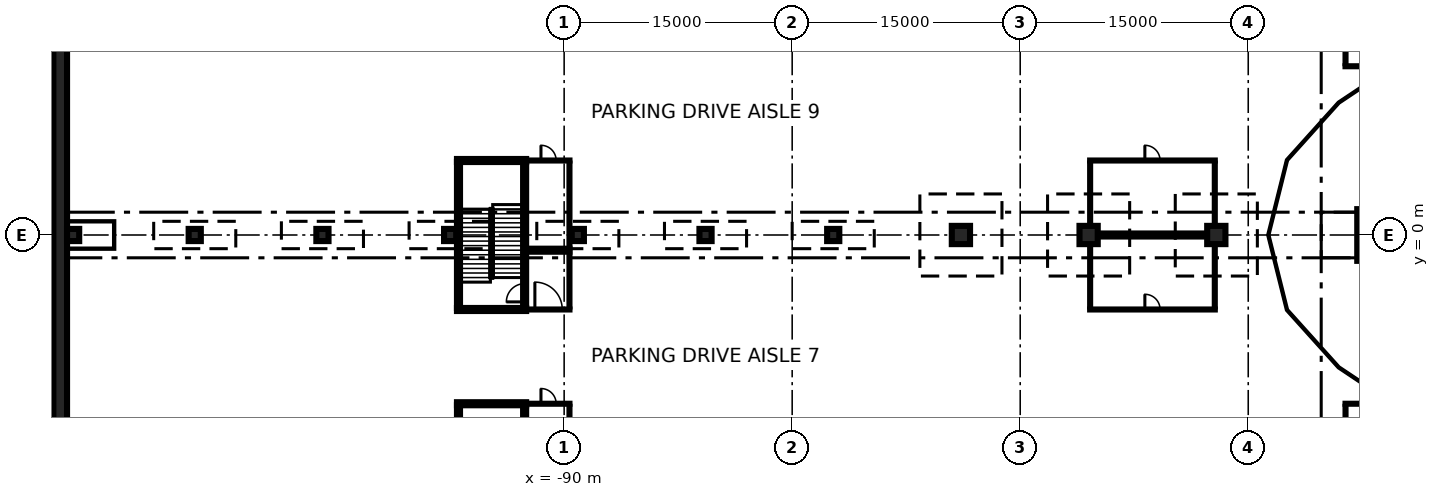
"""IFC4 building model, lengths in metres.
Left out: names, types, materials, properties, quantities, classifications, styles, units other than length and angle.
Written with IfcOpenShell. Run it as: python <this file> out.ifc"""

import sys

from ifc_helpers import new_model, si_unit, direction, frame, frame_2d, origin, origin_2d, place, context, subcontext, project, spatial, rectangle, extrude, element, fill, save


model = new_model("IFC4")
c1 = context("Model", 3, precision=1e-05, world=origin(), true_north=direction((0.0, 1.0)))
c2 = subcontext(c1, "Body", "Model", "MODEL_VIEW")
j1 = project(units=[si_unit("LENGTHUNIT", "METRE"), si_unit("PLANEANGLEUNIT", "RADIAN")], contexts=[c1])
p1 = place(None, origin())
s1 = spatial("IfcSite", under=j1, at=p1, CompositionType="ELEMENT")
p2 = place(p1, origin())
s2 = spatial("IfcBuilding", under=s1, at=p2, CompositionType="ELEMENT")
p3 = place(p2, frame((0.0, 0.0, -12.0)))
s3 = spatial("IfcBuildingStorey", under=s2, at=p3, CompositionType="ELEMENT", Elevation=-12.0)
p4 = place(p3, frame((-123.15, -80.0, 0.0), z_axis=(0.0, 0.0, 1.0), x_axis=(0.0, 1.0, 0.0)))
e1 = element("IfcWall", 1, at=p4, inside=s3, PredefinedType="USERDEFINED", context=c2, shape_type="SweptSolid", body=[
    extrude(rectangle(XDim=160.0, YDim=0.9, at=frame_2d((80.0, 0.0))), origin(), (0.0, 0.0, 1.0), 11.55),
])
p5 = place(p3, frame((-35.729, 0.0, 0.0), z_axis=(0.0, 0.0, 1.0), x_axis=(1.0, 0.0, 0.0)))
e2 = element("IfcColumn", 2, at=p5, inside=s3, PredefinedType="COLUMN", context=c2, shape_type="SweptSolid", body=[
    extrude(rectangle(XDim=4.2, YDim=3.4, at=origin_2d()), origin(), (0.0, 0.0, 1.0), 4.4),
])
for number, where, z_axis, x_axis in (
    (3, (-122.3, 0.0, 0.0), (0.0, 0.0, 1.0), (1.0, 0.0, 0.0)),
    (4, (-114.3, 0.0, 0.0), (0.0, 0.0, 1.0), (1.0, 0.0, 0.0)),
    (5, (-105.9, 0.0, 0.0), (0.0, 0.0, 1.0), (1.0, 0.0, 0.0)),
    (6, (-97.5, 0.0, 0.0), (0.0, 0.0, 1.0), (1.0, 0.0, 0.0)),
    (7, (-89.1, 0.0, 0.0), (0.0, 0.0, 1.0), (1.0, 0.0, 0.0)),
    (8, (-80.7, 0.0, 0.0), (0.0, 0.0, 1.0), (1.0, 0.0, 0.0)),
    (9, (-72.3, 0.0, 0.0), (0.0, 0.0, 1.0), (1.0, 0.0, 0.0)),
):
    element("IfcColumn", number, at=place(p3, frame(where, z_axis=z_axis, x_axis=x_axis)), inside=s3, PredefinedType="COLUMN", context=c2, shape_type="SweptSolid", body=[
        extrude(rectangle(XDim=0.8, YDim=0.8, at=origin_2d()), origin(), (0.0, 0.0, 1.0), 4.4),
    ])
for number, where, z_axis, x_axis in (
    (10, (-63.9, 0.0, 0.0), (0.0, 0.0, 1.0), (1.0, 0.0, 0.0)),
    (11, (-55.5, 0.0, 0.0), (0.0, 0.0, 1.0), (1.0, 0.0, 0.0)),
    (12, (-47.1, 0.0, 0.0), (0.0, 0.0, 1.0), (1.0, 0.0, 0.0)),
):
    element("IfcColumn", number, at=place(p3, frame(where, z_axis=z_axis, x_axis=x_axis)), inside=s3, PredefinedType="COLUMN", context=c2, shape_type="SweptSolid", body=[
        extrude(rectangle(XDim=1.2, YDim=1.2, at=origin_2d()), origin(), (0.0, 0.0, 1.0), 4.4),
    ])
p6 = place(p3, frame((-38.7, -11.1, 0.0), z_axis=(0.0, 0.0, 1.0), x_axis=(1.0, 0.0, 0.0)))
e13 = element("IfcWall", 13, at=p6, inside=s3, PredefinedType="PARTITIONING", context=c2, shape_type="SweptSolid", body=[
    extrude(rectangle(XDim=8.4, YDim=0.2, at=frame_2d((4.2, 0.0))), origin(), (0.0, 0.0, 1.0), 4.4),
])
p7 = place(p6, frame((3.3, 0.0, 0.0)))
e14 = element("IfcOpeningElement", 14, at=p7, cuts=e13, PredefinedType="OPENING", context=c2, shape_type="SweptSolid", body=[
    extrude(rectangle(XDim=1.8, YDim=2.1, at=frame_2d((0.9, 1.05))), frame((0.0, 0.11, 0.0), z_axis=(0.0, -1.0, 0.0), x_axis=(1.0, 0.0, 0.0)), (0.0, 0.0, 1.0), 0.22),
])
p8 = place(p3, frame((-38.6, -15.4, 0.0), z_axis=(0.0, 0.0, 1.0), x_axis=(0.0, 1.0, 0.0)))
e15 = element("IfcWall", 15, at=p8, inside=s3, PredefinedType="PARTITIONING", context=c2, shape_type="SweptSolid", body=[
    extrude(rectangle(XDim=4.2, YDim=0.2, at=frame_2d((2.1, 0.0))), origin(), (0.0, 0.0, 1.0), 4.4),
])
p9 = place(p3, frame((-38.7, 11.1, 0.0), z_axis=(0.0, 0.0, 1.0), x_axis=(1.0, 0.0, 0.0)))
e16 = element("IfcWall", 16, at=p9, inside=s3, PredefinedType="PARTITIONING", context=c2, shape_type="SweptSolid", body=[
    extrude(rectangle(XDim=8.4, YDim=0.2, at=frame_2d((4.2, 0.0))), origin(), (0.0, 0.0, 1.0), 4.4),
])
p10 = place(p9, frame((3.3, 0.0, 0.0)))
e17 = element("IfcOpeningElement", 17, at=p10, cuts=e16, PredefinedType="OPENING", context=c2, shape_type="SweptSolid", body=[
    extrude(rectangle(XDim=1.8, YDim=2.1, at=frame_2d((0.9, 1.05))), frame((0.0, 0.11, 0.0), z_axis=(0.0, -1.0, 0.0), x_axis=(1.0, 0.0, 0.0)), (0.0, 0.0, 1.0), 0.22),
])
p11 = place(p3, frame((-38.6, 11.2, 0.0), z_axis=(0.0, 0.0, 1.0), x_axis=(0.0, 1.0, 0.0)))
e18 = element("IfcWall", 18, at=p11, inside=s3, PredefinedType="PARTITIONING", context=c2, shape_type="SweptSolid", body=[
    extrude(rectangle(XDim=4.2, YDim=0.2, at=frame_2d((2.1, 0.0))), origin(), (0.0, 0.0, 1.0), 4.4),
])
p12 = place(p3, frame((-55.5, -4.9, 0.0), z_axis=(0.0, 0.0, 1.0), x_axis=(1.0, 0.0, 0.0)))
e19 = element("IfcWall", 19, at=p12, inside=s3, PredefinedType="PARTITIONING", context=c2, shape_type="SweptSolid", body=[
    extrude(rectangle(XDim=8.4, YDim=0.2, at=frame_2d((4.2, 0.0))), origin(), (0.0, 0.0, 1.0), 4.4),
])
p13 = place(p12, frame((3.7, 0.0, 0.0)))
e20 = element("IfcOpeningElement", 20, at=p13, cuts=e19, PredefinedType="OPENING", context=c2, shape_type="SweptSolid", body=[
    extrude(rectangle(XDim=1.0, YDim=2.1, at=frame_2d((0.5, 1.05))), frame((0.0, 0.11, 0.0), z_axis=(0.0, -1.0, 0.0), x_axis=(1.0, 0.0, 0.0)), (0.0, 0.0, 1.0), 0.22),
])
p14 = place(p3, frame((-55.5, -0.1, 0.0), z_axis=(0.0, 0.0, 1.0), x_axis=(1.0, 0.0, 0.0)))
e21 = element("IfcWall", 21, at=p14, inside=s3, PredefinedType="PARTITIONING", context=c2, shape_type="SweptSolid", body=[
    extrude(rectangle(XDim=8.4, YDim=0.2, at=frame_2d((4.2, 0.0))), origin(), (0.0, 0.0, 1.0), 4.4),
])
for number, where, z_axis, x_axis in (
    (22, (-55.4, -4.8, 0.0), (0.0, 0.0, 1.0), (0.0, 1.0, 0.0)),
    (23, (-47.2, -4.8, 0.0), (0.0, 0.0, 1.0), (0.0, 1.0, 0.0)),
):
    element("IfcWall", number, at=place(p3, frame(where, z_axis=z_axis, x_axis=x_axis)), inside=s3, PredefinedType="PARTITIONING", context=c2, shape_type="SweptSolid", body=[
        extrude(rectangle(XDim=4.2, YDim=0.2, at=frame_2d((2.1, 0.0))), origin(), (0.0, 0.0, 1.0), 4.4),
    ])
p15 = place(p3, frame((-55.5, 0.1, 0.0), z_axis=(0.0, 0.0, 1.0), x_axis=(1.0, 0.0, 0.0)))
e24 = element("IfcWall", 24, at=p15, inside=s3, PredefinedType="PARTITIONING", context=c2, shape_type="SweptSolid", body=[
    extrude(rectangle(XDim=8.4, YDim=0.2, at=frame_2d((4.2, 0.0))), origin(), (0.0, 0.0, 1.0), 4.4),
])
p16 = place(p3, frame((-55.5, 4.9, 0.0), z_axis=(0.0, 0.0, 1.0), x_axis=(1.0, 0.0, 0.0)))
e25 = element("IfcWall", 25, at=p16, inside=s3, PredefinedType="PARTITIONING", context=c2, shape_type="SweptSolid", body=[
    extrude(rectangle(XDim=8.4, YDim=0.2, at=frame_2d((4.2, 0.0))), origin(), (0.0, 0.0, 1.0), 4.4),
])
p17 = place(p16, frame((3.7, 0.0, 0.0)))
e26 = element("IfcOpeningElement", 26, at=p17, cuts=e25, PredefinedType="OPENING", context=c2, shape_type="SweptSolid", body=[
    extrude(rectangle(XDim=1.0, YDim=2.1, at=frame_2d((0.5, 1.05))), frame((0.0, 0.11, 0.0), z_axis=(0.0, -1.0, 0.0), x_axis=(1.0, 0.0, 0.0)), (0.0, 0.0, 1.0), 0.22),
])
for number, where, z_axis, x_axis in (
    (27, (-55.4, 0.6, 0.0), (0.0, 0.0, 1.0), (0.0, 1.0, 0.0)),
    (28, (-47.2, 0.6, 0.0), (0.0, 0.0, 1.0), (0.0, 1.0, 0.0)),
):
    element("IfcWall", number, at=place(p3, frame(where, z_axis=z_axis, x_axis=x_axis)), inside=s3, PredefinedType="PARTITIONING", context=c2, shape_type="SweptSolid", body=[
        extrude(rectangle(XDim=4.2, YDim=0.2, at=frame_2d((2.1, 0.0))), origin(), (0.0, 0.0, 1.0), 4.4),
    ])
p18 = place(p3, frame((-92.5, -11.1, 0.0), z_axis=(0.0, 0.0, 1.0), x_axis=(1.0, 0.0, 0.0)))
e29 = element("IfcWall", 29, at=p18, inside=s3, PredefinedType="PARTITIONING", context=c2, shape_type="SweptSolid", body=[
    extrude(rectangle(XDim=2.95, YDim=0.2, at=frame_2d((1.475, 0.0))), origin(), (0.0, 0.0, 1.0), 4.4),
])
p19 = place(p18, frame((0.975, 0.0, 0.0)))
e30 = element("IfcOpeningElement", 30, at=p19, cuts=e29, PredefinedType="OPENING", context=c2, shape_type="SweptSolid", body=[
    extrude(rectangle(XDim=1.0, YDim=2.1, at=frame_2d((0.5, 1.05))), frame((0.0, 0.11, 0.0), z_axis=(0.0, -1.0, 0.0), x_axis=(1.0, 0.0, 0.0)), (0.0, 0.0, 1.0), 0.22),
])
p20 = place(p3, frame((-89.65, -16.8, 0.0), z_axis=(0.0, 0.0, 1.0), x_axis=(0.0, 1.0, 0.0)))
e31 = element("IfcWall", 31, at=p20, inside=s3, PredefinedType="PARTITIONING", context=c2, shape_type="SweptSolid", body=[
    extrude(rectangle(XDim=5.6, YDim=0.2, at=frame_2d((2.8, 0.0))), origin(), (0.0, 0.0, 1.0), 4.4),
])
p21 = place(p3, frame((-92.5, -4.9, 0.0), z_axis=(0.0, 0.0, 1.0), x_axis=(1.0, 0.0, 0.0)))
e32 = element("IfcWall", 32, at=p21, inside=s3, PredefinedType="PARTITIONING", context=c2, shape_type="SweptSolid", body=[
    extrude(rectangle(XDim=2.95, YDim=0.2, at=frame_2d((1.475, 0.0))), origin(), (0.0, 0.0, 1.0), 4.4),
])
p22 = place(p21, frame((0.575, 0.0, 0.0)))
e33 = element("IfcOpeningElement", 33, at=p22, cuts=e32, PredefinedType="OPENING", context=c2, shape_type="SweptSolid", body=[
    extrude(rectangle(XDim=1.8, YDim=2.1, at=frame_2d((0.9, 1.05))), frame((0.0, 0.11, 0.0), z_axis=(0.0, -1.0, 0.0), x_axis=(1.0, 0.0, 0.0)), (0.0, 0.0, 1.0), 0.22),
])
p23 = place(p3, frame((-92.5, -1.1, 0.0), z_axis=(0.0, 0.0, 1.0), x_axis=(1.0, 0.0, 0.0)))
e34 = element("IfcWall", 34, at=p23, inside=s3, PredefinedType="PARTITIONING", context=c2, shape_type="SweptSolid", body=[
    extrude(rectangle(XDim=2.95, YDim=0.2, at=frame_2d((1.475, 0.0))), origin(), (0.0, 0.0, 1.0), 4.4),
])
p24 = place(p3, frame((-89.65, -4.8, 0.0), z_axis=(0.0, 0.0, 1.0), x_axis=(0.0, 1.0, 0.0)))
e35 = element("IfcWall", 35, at=p24, inside=s3, PredefinedType="PARTITIONING", context=c2, shape_type="SweptSolid", body=[
    extrude(rectangle(XDim=3.6, YDim=0.2, at=frame_2d((1.8, 0.0))), origin(), (0.0, 0.0, 1.0), 4.4),
])
p25 = place(p3, frame((-92.5, -0.9, 0.0), z_axis=(0.0, 0.0, 1.0), x_axis=(1.0, 0.0, 0.0)))
e36 = element("IfcWall", 36, at=p25, inside=s3, PredefinedType="PARTITIONING", context=c2, shape_type="SweptSolid", body=[
    extrude(rectangle(XDim=2.95, YDim=0.2, at=frame_2d((1.475, 0.0))), origin(), (0.0, 0.0, 1.0), 4.4),
])
p26 = place(p3, frame((-92.5, 4.9, 0.0), z_axis=(0.0, 0.0, 1.0), x_axis=(1.0, 0.0, 0.0)))
e37 = element("IfcWall", 37, at=p26, inside=s3, PredefinedType="PARTITIONING", context=c2, shape_type="SweptSolid", body=[
    extrude(rectangle(XDim=2.95, YDim=0.2, at=frame_2d((1.475, 0.0))), origin(), (0.0, 0.0, 1.0), 4.4),
])
p27 = place(p26, frame((0.975, 0.0, 0.0)))
e38 = element("IfcOpeningElement", 38, at=p27, cuts=e37, PredefinedType="OPENING", context=c2, shape_type="SweptSolid", body=[
    extrude(rectangle(XDim=1.0, YDim=2.1, at=frame_2d((0.5, 1.05))), frame((0.0, 0.11, 0.0), z_axis=(0.0, -1.0, 0.0), x_axis=(1.0, 0.0, 0.0)), (0.0, 0.0, 1.0), 0.22),
])
p28 = place(p3, frame((-89.65, -0.8, 0.0), z_axis=(0.0, 0.0, 1.0), x_axis=(0.0, 1.0, 0.0)))
e39 = element("IfcWall", 39, at=p28, inside=s3, PredefinedType="PARTITIONING", context=c2, shape_type="SweptSolid", body=[
    extrude(rectangle(XDim=5.6, YDim=0.2, at=frame_2d((2.8, 0.0))), origin(), (0.0, 0.0, 1.0), 4.4),
])
p29 = place(p3, frame((-96.95, -20.8, 0.0), z_axis=(0.0, 0.0, 1.0), x_axis=(0.0, 1.0, 0.0)))
e40 = element("IfcWall", 40, at=p29, inside=s3, PredefinedType="SOLIDWALL", context=c2, shape_type="SweptSolid", body=[
    extrude(rectangle(XDim=9.6, YDim=0.2, at=frame_2d((4.8, 0.0))), origin(), (0.0, 0.0, 1.0), 4.4),
])
p30 = place(p3, frame((-92.6, -20.8, 0.0), z_axis=(0.0, 0.0, 1.0), x_axis=(0.0, 1.0, 0.0)))
e41 = element("IfcWall", 41, at=p30, inside=s3, PredefinedType="SOLIDWALL", context=c2, shape_type="SweptSolid", body=[
    extrude(rectangle(XDim=9.6, YDim=0.2, at=frame_2d((4.8, 0.0))), origin(), (0.0, 0.0, 1.0), 4.4),
])
p31 = place(p30, frame((0.4, 0.0, 0.0)))
e42 = element("IfcOpeningElement", 42, at=p31, cuts=e41, PredefinedType="OPENING", context=c2, shape_type="SweptSolid", body=[
    extrude(rectangle(XDim=1.2, YDim=2.1, at=frame_2d((0.6, 1.05))), frame((0.0, 0.11, 0.0), z_axis=(0.0, -1.0, 0.0), x_axis=(1.0, 0.0, 0.0)), (0.0, 0.0, 1.0), 0.22),
])
p32 = place(p3, frame((-97.05, -11.1, 0.0), z_axis=(0.0, 0.0, 1.0), x_axis=(1.0, 0.0, 0.0)))
e43 = element("IfcWall", 43, at=p32, inside=s3, PredefinedType="SOLIDWALL", context=c2, shape_type="SweptSolid", body=[
    extrude(rectangle(XDim=4.55, YDim=0.2, at=frame_2d((2.275, 0.0))), origin(), (0.0, 0.0, 1.0), 4.4),
])
p33 = place(p3, frame((-96.95, -4.8, 0.0), z_axis=(0.0, 0.0, 1.0), x_axis=(0.0, 1.0, 0.0)))
e44 = element("IfcWall", 44, at=p33, inside=s3, PredefinedType="SOLIDWALL", context=c2, shape_type="SweptSolid", body=[
    extrude(rectangle(XDim=9.6, YDim=0.2, at=frame_2d((4.8, 0.0))), origin(), (0.0, 0.0, 1.0), 4.4),
])
p34 = place(p3, frame((-92.6, -4.8, 0.0), z_axis=(0.0, 0.0, 1.0), x_axis=(0.0, 1.0, 0.0)))
e45 = element("IfcWall", 45, at=p34, inside=s3, PredefinedType="SOLIDWALL", context=c2, shape_type="SweptSolid", body=[
    extrude(rectangle(XDim=9.6, YDim=0.2, at=frame_2d((4.8, 0.0))), origin(), (0.0, 0.0, 1.0), 4.4),
])
p35 = place(p34, frame((0.4, 0.0, 0.0)))
e46 = element("IfcOpeningElement", 46, at=p35, cuts=e45, PredefinedType="OPENING", context=c2, shape_type="SweptSolid", body=[
    extrude(rectangle(XDim=1.2, YDim=2.1, at=frame_2d((0.6, 1.05))), frame((0.0, 0.11, 0.0), z_axis=(0.0, -1.0, 0.0), x_axis=(1.0, 0.0, 0.0)), (0.0, 0.0, 1.0), 0.22),
])
for number, where, z_axis, x_axis in (
    (47, (-92.5, -4.9, 0.0), (0.0, 0.0, 1.0), (-1.0, 0.0, 0.0)),
    (48, (-97.05, 4.9, 0.0), (0.0, 0.0, 1.0), (1.0, 0.0, 0.0)),
):
    element("IfcWall", number, at=place(p3, frame(where, z_axis=z_axis, x_axis=x_axis)), inside=s3, PredefinedType="SOLIDWALL", context=c2, shape_type="SweptSolid", body=[
        extrude(rectangle(XDim=4.55, YDim=0.2, at=frame_2d((2.275, 0.0))), origin(), (0.0, 0.0, 1.0), 4.4),
    ])
p36 = place(p13, origin())
e49 = element("IfcDoor", 49, at=p36, inside=s3, OperationType="SINGLE_SWING_LEFT", PredefinedType="DOOR", context=c2, shape_type="SweptSolid", body=[
    extrude(rectangle(XDim=1.0, YDim=2.1, at=frame_2d((0.5, 1.05))), frame((0.0, 0.025, 0.0), z_axis=(0.0, -1.0, 0.0), x_axis=(1.0, 0.0, 0.0)), (0.0, 0.0, 1.0), 0.05),
])
fill(e20, e49)
p37 = place(p17, origin())
e50 = element("IfcDoor", 50, at=p37, inside=s3, OperationType="SINGLE_SWING_LEFT", PredefinedType="DOOR", context=c2, shape_type="SweptSolid", body=[
    extrude(rectangle(XDim=1.0, YDim=2.1, at=frame_2d((0.5, 1.05))), frame((0.0, 0.025, 0.0), z_axis=(0.0, -1.0, 0.0), x_axis=(1.0, 0.0, 0.0)), (0.0, 0.0, 1.0), 0.05),
])
fill(e26, e50)
p38 = place(p19, origin())
e51 = element("IfcDoor", 51, at=p38, inside=s3, OperationType="SINGLE_SWING_LEFT", PredefinedType="DOOR", context=c2, shape_type="SweptSolid", body=[
    extrude(rectangle(XDim=1.0, YDim=2.1, at=frame_2d((0.5, 1.05))), frame((0.0, 0.025, 0.0), z_axis=(0.0, -1.0, 0.0), x_axis=(1.0, 0.0, 0.0)), (0.0, 0.0, 1.0), 0.05),
])
fill(e30, e51)
p39 = place(p22, origin())
e52 = element("IfcDoor", 52, at=p39, inside=s3, OperationType="DOUBLE_DOOR_SINGLE_SWING", PredefinedType="DOOR", context=c2, shape_type="SweptSolid", body=[
    extrude(rectangle(XDim=1.8, YDim=2.1, at=frame_2d((0.9, 1.05))), frame((0.0, 0.025, 0.0), z_axis=(0.0, -1.0, 0.0), x_axis=(1.0, 0.0, 0.0)), (0.0, 0.0, 1.0), 0.05),
])
fill(e33, e52)
p40 = place(p27, origin())
e53 = element("IfcDoor", 53, at=p40, inside=s3, OperationType="SINGLE_SWING_LEFT", PredefinedType="DOOR", context=c2, shape_type="SweptSolid", body=[
    extrude(rectangle(XDim=1.0, YDim=2.1, at=frame_2d((0.5, 1.05))), frame((0.0, 0.025, 0.0), z_axis=(0.0, -1.0, 0.0), x_axis=(1.0, 0.0, 0.0)), (0.0, 0.0, 1.0), 0.05),
])
fill(e38, e53)
p41 = place(p35, origin())
e54 = element("IfcDoor", 54, at=p41, inside=s3, OperationType="SINGLE_SWING_LEFT", PredefinedType="DOOR", context=c2, shape_type="SweptSolid", body=[
    extrude(rectangle(XDim=1.2, YDim=2.1, at=frame_2d((0.6, 1.05))), frame((0.0, 0.025, 0.0), z_axis=(0.0, -1.0, 0.0), x_axis=(1.0, 0.0, 0.0)), (0.0, 0.0, 1.0), 0.05),
])
fill(e46, e54)
save(model, sys.argv[1])
